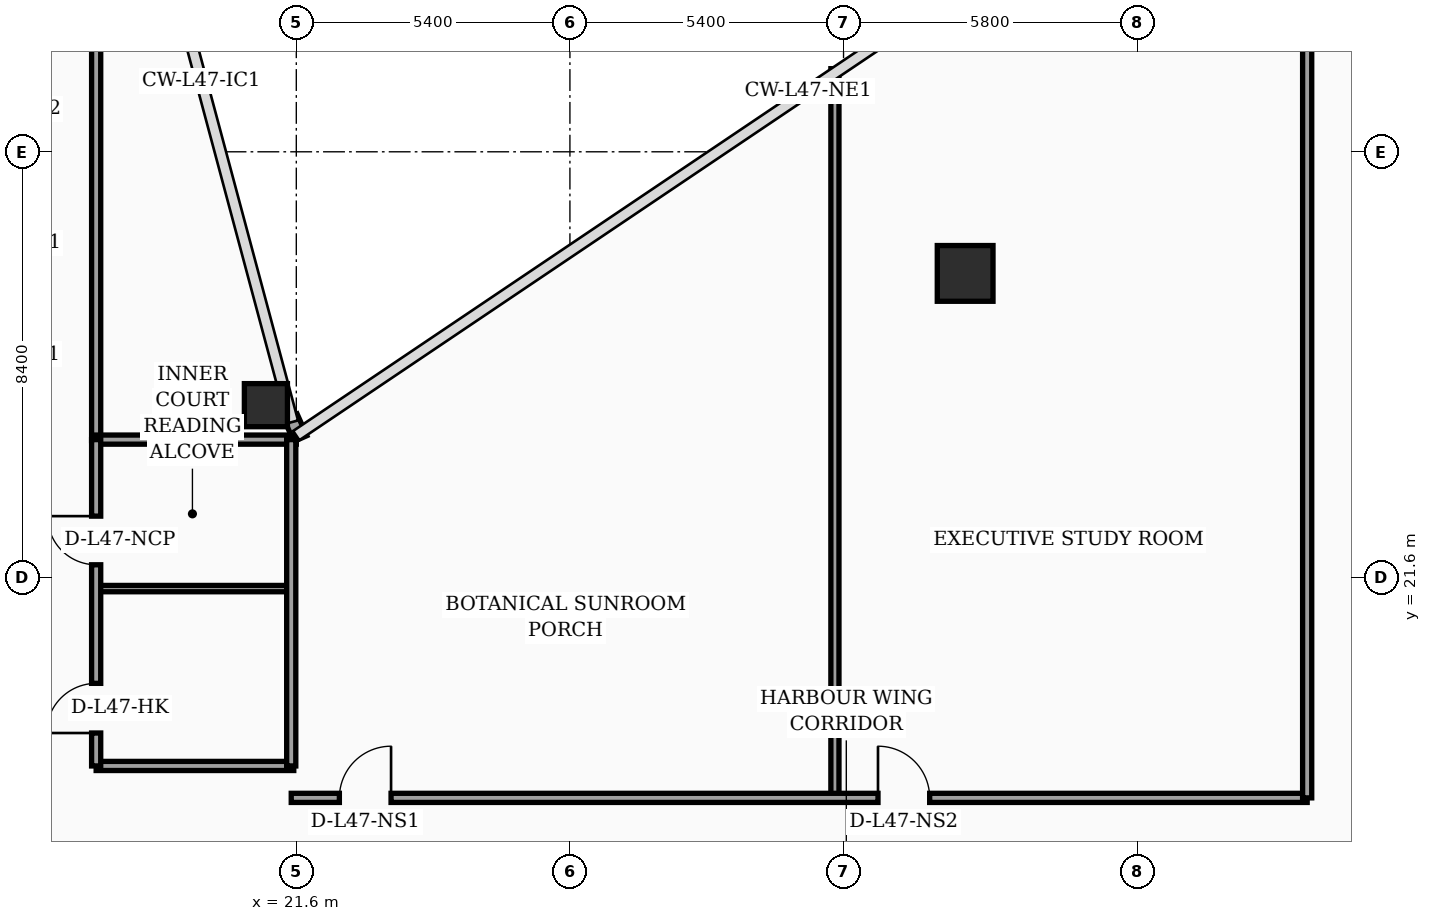
"""IFC4 building model, lengths in metres.
Left out: names, types, materials, properties, quantities, classifications, styles, units other than length and angle.
Written with IfcOpenShell. Run it as: python <this file> out.ifc"""

import sys

from ifc_helpers import new_model, si_unit, direction, frame, frame_2d, origin, origin_2d, place, context, subcontext, project, spatial, rectangle, hollow_rectangle, circle, extrude, element, fill, save


model = new_model("IFC4")
c1 = context("Model", 3, precision=1e-05, world=origin(), true_north=direction((0.0, 1.0)))
c2 = subcontext(c1, "Body", "Model", "MODEL_VIEW")
j1 = project(units=[si_unit("LENGTHUNIT", "METRE"), si_unit("PLANEANGLEUNIT", "RADIAN")], contexts=[c1])
p1 = place(None, origin())
s1 = spatial("IfcSite", under=j1, at=p1, CompositionType="ELEMENT")
p2 = place(p1, origin())
s2 = spatial("IfcBuilding", under=s1, at=p2, CompositionType="ELEMENT")
p3 = place(p2, frame((0.0, 0.0, 191.3)))
s3 = spatial("IfcBuildingStorey", under=s2, at=p3, CompositionType="ELEMENT", Elevation=191.3)
p4 = place(p3, frame((21.0, 25.0, 0.0), z_axis=(0.0, 0.0, 1.0), x_axis=(1.0, 0.0, 0.0)))
e1 = element("IfcColumn", 1, at=p4, inside=s3, PredefinedType="COLUMN", context=c2, shape_type="SweptSolid", body=[
    extrude(hollow_rectangle(XDim=0.85, YDim=0.85, WallThickness=0.036, at=origin_2d()), origin(), (0.0, 0.0, 1.0), 3.56),
])
p5 = place(p3, frame((34.8, 27.6, 0.0), z_axis=(0.0, 0.0, 1.0), x_axis=(1.0, 0.0, 0.0)))
e2 = element("IfcColumn", 2, at=p5, inside=s3, PredefinedType="COLUMN", context=c2, shape_type="SweptSolid", body=[
    extrude(circle(Radius=0.55, at=origin_2d()), origin(), (0.0, 0.0, 1.0), 3.56),
])
p6 = place(p3, frame((21.68, 24.34, 0.0), z_axis=(0.0, 0.0, 1.0), x_axis=(-0.40758134973, 0.913168901875, 0.0)))
e3 = element("IfcWall", 3, at=p6, inside=s3, PredefinedType="SOLIDWALL", context=c2, shape_type="SweptSolid", body=[
    extrude(rectangle(XDim=0.471, YDim=0.28, at=frame_2d((0.235, 0.0))), origin(), (0.0, 0.0, 1.0), 3.56),
])
p7 = place(p3, frame((17.65, 24.3, 0.0), z_axis=(0.0, 0.0, 1.0), x_axis=(0.0, 1.0, 0.0)))
e4 = element("IfcWall", 4, at=p7, inside=s3, PredefinedType="PARTITIONING", context=c2, shape_type="SweptSolid", body=[
    extrude(rectangle(XDim=18.15, YDim=0.18, at=frame_2d((9.075, 0.0))), origin(), (0.0, 0.0, 1.0), 2.94),
])
p8 = place(p3, frame((17.65, 17.88, 0.0), z_axis=(0.0, 0.0, 1.0), x_axis=(1.0, 0.0, 0.0)))
e5 = element("IfcWall", 5, at=p8, inside=s3, PredefinedType="PARTITIONING", context=c2, shape_type="SweptSolid", body=[
    extrude(rectangle(XDim=3.9, YDim=0.18, at=frame_2d((1.95, 0.0))), origin(), (0.0, 0.0, 1.0), 3.56),
])
p9 = place(p3, frame((17.65, 21.38, 0.0), z_axis=(0.0, 0.0, 1.0), x_axis=(1.0, 0.0, 0.0)))
e6 = element("IfcWall", 6, at=p9, inside=s3, PredefinedType="PARTITIONING", context=c2, shape_type="SweptSolid", body=[
    extrude(rectangle(XDim=3.9, YDim=0.125, at=frame_2d((1.95, 0.0))), origin(), (0.0, 0.0, 1.0), 3.56),
])
p10 = place(p3, frame((17.65, 24.32, 0.0), z_axis=(0.0, 0.0, 1.0), x_axis=(1.0, 0.0, 0.0)))
e7 = element("IfcWall", 7, at=p10, inside=s3, PredefinedType="PARTITIONING", context=c2, shape_type="SweptSolid", body=[
    extrude(rectangle(XDim=3.95, YDim=0.18, at=frame_2d((1.975, 0.0))), origin(), (0.0, 0.0, 1.0), 3.56),
])
p11 = place(p3, frame((21.5, 17.88, 0.0), z_axis=(0.0, 0.0, 1.0), x_axis=(0.0, 1.0, 0.0)))
e8 = element("IfcWall", 8, at=p11, inside=s3, PredefinedType="PARTITIONING", context=c2, shape_type="SweptSolid", body=[
    extrude(rectangle(XDim=6.44, YDim=0.18, at=frame_2d((3.22, 0.0))), origin(), (0.0, 0.0, 1.0), 3.56),
])
p12 = place(p3, frame((17.65, 17.88, 0.0), z_axis=(0.0, 0.0, 1.0), x_axis=(0.0, 1.0, 0.0)))
e9 = element("IfcWall", 9, at=p12, inside=s3, PredefinedType="PARTITIONING", context=c2, shape_type="SweptSolid", body=[
    extrude(rectangle(XDim=6.44, YDim=0.18, at=frame_2d((3.22, 0.0))), origin(), (0.0, 0.0, 1.0), 3.56),
])
p13 = place(p12, frame((0.65, 0.0, 0.0)))
e10 = element("IfcOpeningElement", 10, at=p13, cuts=e9, PredefinedType="OPENING", context=c2, shape_type="SweptSolid", body=[
    extrude(rectangle(XDim=0.98, YDim=2.15, at=frame_2d((0.49, 1.075))), frame((0.0, 0.1, 0.0), z_axis=(0.0, -1.0, 0.0), x_axis=(1.0, 0.0, 0.0)), (0.0, 0.0, 1.0), 0.2),
])
p14 = place(p12, frame((3.97, 0.0, 0.0)))
e11 = element("IfcOpeningElement", 11, at=p14, cuts=e9, PredefinedType="OPENING", context=c2, shape_type="SweptSolid", body=[
    extrude(rectangle(XDim=0.96, YDim=2.2, at=frame_2d((0.48, 1.1))), frame((0.0, 0.1, 0.0), z_axis=(0.0, -1.0, 0.0), x_axis=(1.0, 0.0, 0.0)), (0.0, 0.0, 1.0), 0.2),
])
p15 = place(p3, frame((32.23, 17.25, 0.0), z_axis=(0.0, 0.0, 1.0), x_axis=(0.0, 1.0, 0.0)))
e12 = element("IfcWall", 12, at=p15, inside=s3, PredefinedType="PARTITIONING", context=c2, shape_type="SweptSolid", body=[
    extrude(rectangle(XDim=14.39, YDim=0.16, at=frame_2d((7.195, 0.0))), origin(), (0.0, 0.0, 1.0), 2.94),
])
p16 = place(p3, frame((21.5, 17.25, 0.0), z_axis=(0.0, 0.0, 1.0), x_axis=(1.0, 0.0, 0.0)))
e13 = element("IfcWall", 13, at=p16, inside=s3, PredefinedType="PARTITIONING", context=c2, shape_type="SweptSolid", body=[
    extrude(rectangle(XDim=20.05, YDim=0.18, at=frame_2d((10.025, 0.0))), origin(), (0.0, 0.0, 1.0), 2.94),
])
p17 = place(p16, frame((0.95, 0.0, 0.0)))
e14 = element("IfcOpeningElement", 14, at=p17, cuts=e13, PredefinedType="OPENING", context=c2, shape_type="SweptSolid", body=[
    extrude(rectangle(XDim=1.02, YDim=2.2, at=frame_2d((0.51, 1.1))), frame((0.0, 0.1, 0.0), z_axis=(0.0, -1.0, 0.0), x_axis=(1.0, 0.0, 0.0)), (0.0, 0.0, 1.0), 0.2),
])
p18 = place(p16, frame((11.58, 0.0, 0.0)))
e15 = element("IfcOpeningElement", 15, at=p18, cuts=e13, PredefinedType="OPENING", context=c2, shape_type="SweptSolid", body=[
    extrude(rectangle(XDim=1.02, YDim=2.2, at=frame_2d((0.51, 1.1))), frame((0.0, 0.1, 0.0), z_axis=(0.0, -1.0, 0.0), x_axis=(1.0, 0.0, 0.0)), (0.0, 0.0, 1.0), 0.2),
])
p19 = place(p3, frame((41.55, 17.25, 0.0), z_axis=(0.0, 0.0, 1.0), x_axis=(0.0, 1.0, 0.0)))
e16 = element("IfcWall", 16, at=p19, inside=s3, PredefinedType="PARTITIONING", context=c2, shape_type="SweptSolid", body=[
    extrude(rectangle(XDim=20.66, YDim=0.18, at=frame_2d((10.33, 0.0))), origin(), (0.0, 0.0, 1.0), 2.94),
])
p20 = place(p13, origin())
e17 = element("IfcDoor", 17, at=p20, inside=s3, OperationType="SINGLE_SWING_LEFT", PredefinedType="DOOR", context=c2, shape_type="SweptSolid", body=[
    extrude(rectangle(XDim=0.98, YDim=2.15, at=frame_2d((0.49, 1.075))), frame((0.0, 0.025, 0.0), z_axis=(0.0, -1.0, 0.0), x_axis=(1.0, 0.0, 0.0)), (0.0, 0.0, 1.0), 0.05),
])
fill(e10, e17)
p21 = place(p14, origin())
e18 = element("IfcDoor", 18, at=p21, inside=s3, OperationType="SINGLE_SWING_RIGHT", PredefinedType="DOOR", context=c2, shape_type="SweptSolid", body=[
    extrude(rectangle(XDim=0.96, YDim=2.2, at=frame_2d((0.48, 1.1))), frame((0.0, 0.025, 0.0), z_axis=(0.0, -1.0, 0.0), x_axis=(1.0, 0.0, 0.0)), (0.0, 0.0, 1.0), 0.05),
])
fill(e11, e18)
p22 = place(p17, origin())
e19 = element("IfcDoor", 19, at=p22, inside=s3, OperationType="SINGLE_SWING_RIGHT", PredefinedType="DOOR", context=c2, shape_type="SweptSolid", body=[
    extrude(rectangle(XDim=1.02, YDim=2.2, at=frame_2d((0.51, 1.1))), frame((0.0, 0.025, 0.0), z_axis=(0.0, -1.0, 0.0), x_axis=(1.0, 0.0, 0.0)), (0.0, 0.0, 1.0), 0.05),
])
fill(e14, e19)
p23 = place(p18, origin())
e20 = element("IfcDoor", 20, at=p23, inside=s3, OperationType="SINGLE_SWING_LEFT", PredefinedType="DOOR", context=c2, shape_type="SweptSolid", body=[
    extrude(rectangle(XDim=1.02, YDim=2.2, at=frame_2d((0.51, 1.1))), frame((0.0, 0.025, 0.0), z_axis=(0.0, -1.0, 0.0), x_axis=(1.0, 0.0, 0.0)), (0.0, 0.0, 1.0), 0.05),
])
fill(e15, e20)
save(model, sys.argv[1])
